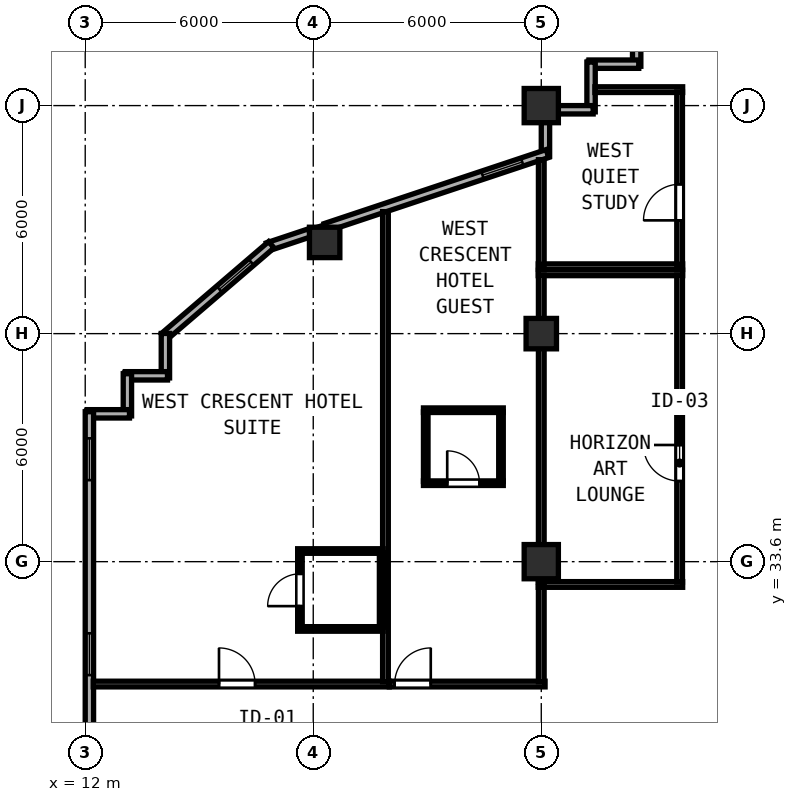
"""IFC4 building model, lengths in metres.
Left out: names, types, materials, properties, quantities, classifications, styles, units other than length and angle.
Written with IfcOpenShell. Run it as: python <this file> out.ifc"""

import sys

from ifc_helpers import new_model, si_unit, direction, frame, frame_2d, origin, origin_2d, place, context, subcontext, project, spatial, rectangle, hollow_rectangle, extrude, element, fill, save


model = new_model("IFC4")
c1 = context("Model", 3, precision=1e-05, world=origin(), true_north=direction((0.0, 1.0)))
c2 = subcontext(c1, "Body", "Model", "MODEL_VIEW")
j1 = project(units=[si_unit("LENGTHUNIT", "METRE"), si_unit("PLANEANGLEUNIT", "RADIAN")], contexts=[c1])
p1 = place(None, origin())
s1 = spatial("IfcSite", under=j1, at=p1, CompositionType="ELEMENT")
p2 = place(p1, origin())
s2 = spatial("IfcBuilding", under=s1, at=p2, CompositionType="ELEMENT")
p3 = place(p2, frame((0.0, 0.0, 184.2)))
s3 = spatial("IfcBuildingStorey", under=s2, at=p3, CompositionType="ELEMENT", Elevation=184.2)
for number, where, z_axis, x_axis in (
    (1, (24.0, 33.6, 0.0), (0.0, 0.0, 1.0), (1.0, 0.0, 0.0)),
    (2, (24.0, 45.6, 0.0), (0.0, 0.0, 1.0), (1.0, 0.0, 0.0)),
):
    element("IfcColumn", number, at=place(p3, frame(where, z_axis=z_axis, x_axis=x_axis)), inside=s3, PredefinedType="COLUMN", context=c2, shape_type="SweptSolid", body=[
        extrude(hollow_rectangle(XDim=0.9, YDim=0.9, WallThickness=0.034, at=origin_2d()), origin(), (0.0, 0.0, 1.0), 3.8),
    ])
for number, where, z_axis, x_axis in (
    (3, (24.0, 39.6, 0.0), (0.0, 0.0, 1.0), (1.0, 0.0, 0.0)),
    (4, (18.3, 42.0, 0.0), (0.0, 0.0, 1.0), (1.0, 0.0, 0.0)),
):
    element("IfcColumn", number, at=place(p3, frame(where, z_axis=z_axis, x_axis=x_axis)), inside=s3, PredefinedType="COLUMN", context=c2, shape_type="SweptSolid", body=[
        extrude(hollow_rectangle(XDim=0.8, YDim=0.8, WallThickness=0.03, at=origin_2d()), origin(), (0.0, 0.0, 1.0), 3.8),
    ])
p4 = place(p3, frame((26.51, 48.0, 0.0), z_axis=(0.0, 0.0, 1.0), x_axis=(0.0, -1.0, 0.0)))
e5 = element("IfcWall", 5, at=p4, inside=s3, PredefinedType="SOLIDWALL", context=c2, shape_type="SweptSolid", body=[
    extrude(rectangle(XDim=1.365, YDim=0.22, at=frame_2d((0.683, 0.0))), origin(), (0.0, 0.0, 1.0), 3.62),
])
for number, where, z_axis, x_axis in (
    (6, (26.565, 46.69, 0.0), (0.0, 0.0, 1.0), (-1.0, 0.0, 0.0)),
    (7, (25.31, 46.745, 0.0), (0.0, 0.0, 1.0), (0.0, -1.0, 0.0)),
):
    element("IfcWall", number, at=place(p3, frame(where, z_axis=z_axis, x_axis=x_axis)), inside=s3, PredefinedType="SOLIDWALL", context=c2, shape_type="SweptSolid", body=[
        extrude(rectangle(XDim=1.31, YDim=0.22, at=frame_2d((0.655, 0.0))), origin(), (0.0, 0.0, 1.0), 3.62),
    ])
p5 = place(p3, frame((25.365, 45.49, 0.0), z_axis=(0.0, 0.0, 1.0), x_axis=(-1.0, 0.0, 0.0)))
e8 = element("IfcWall", 8, at=p5, inside=s3, PredefinedType="SOLIDWALL", context=c2, shape_type="SweptSolid", body=[
    extrude(rectangle(XDim=0.923, YDim=0.22, at=frame_2d((0.461, 0.0))), origin(), (0.0, 0.0, 1.0), 3.62),
])
p6 = place(p3, frame((24.11, 45.158, 0.0), z_axis=(0.0, 0.0, 1.0), x_axis=(0.0, -1.0, 0.0)))
e9 = element("IfcWall", 9, at=p6, inside=s3, PredefinedType="SOLIDWALL", context=c2, shape_type="SweptSolid", body=[
    extrude(rectangle(XDim=0.892, YDim=0.22, at=frame_2d((0.446, 0.0))), origin(), (0.0, 0.0, 1.0), 3.215),
])
p7 = place(p3, frame((24.162, 44.338, 0.0), z_axis=(0.0, 0.0, 1.0), x_axis=(-0.948687265055, -0.316215864755, 0.0)))
e10 = element("IfcWall", 10, at=p7, inside=s3, PredefinedType="SOLIDWALL", context=c2, shape_type="SweptSolid", body=[
    extrude(rectangle(XDim=6.154, YDim=0.22, at=frame_2d((3.077, 0.0))), origin(), (0.0, 0.0, 1.0), 3.215),
])
p8 = place(p7, frame((0.7, 0.0, 0.85)))
e11 = element("IfcOpeningElement", 11, at=p8, cuts=e10, PredefinedType="OPENING", context=c2, shape_type="SweptSolid", body=[
    extrude(rectangle(XDim=1.1, YDim=1.75, at=frame_2d((0.55, 0.875))), frame((0.0, 0.12, 0.0), z_axis=(0.0, -1.0, 0.0), x_axis=(1.0, 0.0, 0.0)), (0.0, 0.0, 1.0), 0.24),
])
p9 = place(p3, frame((17.908, 42.253, 0.0), z_axis=(0.0, 0.0, 1.0), x_axis=(-0.948662335685, -0.316290646166, 0.0)))
e12 = element("IfcWall", 12, at=p9, inside=s3, PredefinedType="SOLIDWALL", context=c2, shape_type="SweptSolid", body=[
    extrude(rectangle(XDim=1.165, YDim=0.22, at=frame_2d((0.583, 0.0))), origin(), (0.0, 0.0, 1.0), 3.62),
])
p10 = place(p3, frame((16.897, 41.938, 0.0), z_axis=(0.0, 0.0, 1.0), x_axis=(-0.759279729622, -0.650764390686, 0.0)))
e13 = element("IfcWall", 13, at=p10, inside=s3, PredefinedType="SOLIDWALL", context=c2, shape_type="SweptSolid", body=[
    extrude(rectangle(XDim=3.726, YDim=0.22, at=frame_2d((1.863, 0.0))), origin(), (0.0, 0.0, 1.0), 3.62),
])
p11 = place(p10, frame((0.7, 0.0, 0.85)))
e14 = element("IfcOpeningElement", 14, at=p11, cuts=e13, PredefinedType="OPENING", context=c2, shape_type="SweptSolid", body=[
    extrude(rectangle(XDim=1.1, YDim=1.75, at=frame_2d((0.55, 0.875))), frame((0.0, 0.12, 0.0), z_axis=(0.0, -1.0, 0.0), x_axis=(1.0, 0.0, 0.0)), (0.0, 0.0, 1.0), 0.24),
])
p12 = place(p3, frame((14.11, 39.604, 0.0), z_axis=(0.0, 0.0, 1.0), x_axis=(0.0, -1.0, 0.0)))
e15 = element("IfcWall", 15, at=p12, inside=s3, PredefinedType="SOLIDWALL", context=c2, shape_type="SweptSolid", body=[
    extrude(rectangle(XDim=1.169, YDim=0.22, at=frame_2d((0.585, 0.0))), origin(), (0.0, 0.0, 1.0), 3.62),
])
p13 = place(p3, frame((14.165, 38.49, 0.0), z_axis=(0.0, 0.0, 1.0), x_axis=(-1.0, 0.0, 0.0)))
e16 = element("IfcWall", 16, at=p13, inside=s3, PredefinedType="SOLIDWALL", context=c2, shape_type="SweptSolid", body=[
    extrude(rectangle(XDim=1.11, YDim=0.22, at=frame_2d((0.555, 0.0))), origin(), (0.0, 0.0, 1.0), 3.62),
])
p14 = place(p3, frame((13.11, 38.545, 0.0), z_axis=(0.0, 0.0, 1.0), x_axis=(0.0, -1.0, 0.0)))
e17 = element("IfcWall", 17, at=p14, inside=s3, PredefinedType="SOLIDWALL", context=c2, shape_type="SweptSolid", body=[
    extrude(rectangle(XDim=1.11, YDim=0.22, at=frame_2d((0.555, 0.0))), origin(), (0.0, 0.0, 1.0), 3.62),
])
p15 = place(p3, frame((13.165, 37.49, 0.0), z_axis=(0.0, 0.0, 1.0), x_axis=(-1.0, 0.0, 0.0)))
e18 = element("IfcWall", 18, at=p15, inside=s3, PredefinedType="SOLIDWALL", context=c2, shape_type="SweptSolid", body=[
    extrude(rectangle(XDim=1.11, YDim=0.22, at=frame_2d((0.555, 0.0))), origin(), (0.0, 0.0, 1.0), 3.62),
])
p16 = place(p3, frame((12.11, 37.545, 0.0), z_axis=(0.0, 0.0, 1.0), x_axis=(0.0, -1.0, 0.0)))
e19 = element("IfcWall", 19, at=p16, inside=s3, PredefinedType="SOLIDWALL", context=c2, shape_type="SweptSolid", body=[
    extrude(rectangle(XDim=21.145, YDim=0.22, at=frame_2d((10.573, 0.0))), origin(), (0.0, 0.0, 1.0), 3.62),
])
p17 = place(p16, frame((0.7, 0.0, 0.85)))
e20 = element("IfcOpeningElement", 20, at=p17, cuts=e19, PredefinedType="OPENING", context=c2, shape_type="SweptSolid", body=[
    extrude(rectangle(XDim=1.1, YDim=1.75, at=frame_2d((0.55, 0.875))), frame((0.0, 0.12, 0.0), z_axis=(0.0, -1.0, 0.0), x_axis=(1.0, 0.0, 0.0)), (0.0, 0.0, 1.0), 0.24),
])
p18 = place(p16, frame((5.83, 0.0, 0.85)))
e21 = element("IfcOpeningElement", 21, at=p18, cuts=e19, PredefinedType="OPENING", context=c2, shape_type="SweptSolid", body=[
    extrude(rectangle(XDim=1.1, YDim=1.75, at=frame_2d((0.55, 0.875))), frame((0.0, 0.12, 0.0), z_axis=(0.0, -1.0, 0.0), x_axis=(1.0, 0.0, 0.0)), (0.0, 0.0, 1.0), 0.24),
])
p19 = place(p16, frame((11.5, 0.0, 0.85)))
e22 = element("IfcOpeningElement", 22, at=p19, cuts=e19, PredefinedType="OPENING", context=c2, shape_type="SweptSolid", body=[
    extrude(rectangle(XDim=1.1, YDim=1.75, at=frame_2d((0.55, 0.875))), frame((0.0, 0.12, 0.0), z_axis=(0.0, -1.0, 0.0), x_axis=(1.0, 0.0, 0.0)), (0.0, 0.0, 1.0), 0.24),
])
p20 = place(p16, frame((16.9, 0.0, 0.85)))
e23 = element("IfcOpeningElement", 23, at=p20, cuts=e19, PredefinedType="OPENING", context=c2, shape_type="SweptSolid", body=[
    extrude(rectangle(XDim=1.1, YDim=1.75, at=frame_2d((0.55, 0.875))), frame((0.0, 0.12, 0.0), z_axis=(0.0, -1.0, 0.0), x_axis=(1.0, 0.0, 0.0)), (0.0, 0.0, 1.0), 0.24),
])
for number, where, z_axis, x_axis in (
    (24, (23.92, 41.2, 0.0), (0.0, 0.0, 1.0), (1.0, 0.0, 0.0)),
    (25, (23.92, 33.0, 0.0), (0.0, 0.0, 1.0), (1.0, 0.0, 0.0)),
):
    element("IfcWall", number, at=place(p3, frame(where, z_axis=z_axis, x_axis=x_axis)), inside=s3, PredefinedType="PARTITIONING", context=c2, shape_type="SweptSolid", body=[
        extrude(rectangle(XDim=3.8, YDim=0.15, at=frame_2d((1.9, 0.0))), origin(), (0.0, 0.0, 1.0), 3.62),
    ])
p21 = place(p3, frame((24.0, 33.06, 0.0), z_axis=(0.0, 0.0, 1.0), x_axis=(0.0, 1.0, 0.0)))
e26 = element("IfcWall", 26, at=p21, inside=s3, PredefinedType="PARTITIONING", context=c2, shape_type="SweptSolid", body=[
    extrude(rectangle(XDim=8.08, YDim=0.15, at=frame_2d((4.04, 0.0))), origin(), (0.0, 0.0, 1.0), 3.215),
])
p22 = place(p3, frame((27.64, 33.06, 0.0), z_axis=(0.0, 0.0, 1.0), x_axis=(0.0, 1.0, 0.0)))
e27 = element("IfcWall", 27, at=p22, inside=s3, PredefinedType="PARTITIONING", context=c2, shape_type="SweptSolid", body=[
    extrude(rectangle(XDim=8.08, YDim=0.15, at=frame_2d((4.04, 0.0))), origin(), (0.0, 0.0, 1.0), 3.62),
])
p23 = place(p22, frame((3.61, 0.0, 0.0), z_axis=(0.0, 0.0, 1.0), x_axis=(-1.0, 0.0, 0.0)))
e28 = element("IfcOpeningElement", 28, at=p23, cuts=e27, PredefinedType="OPENING", context=c2, shape_type="SweptSolid", body=[
    extrude(rectangle(XDim=0.95, YDim=2.12, at=frame_2d((0.475, 1.06))), frame((0.0, 0.085, 0.0), z_axis=(0.0, -1.0, 0.0), x_axis=(1.0, 0.0, 0.0)), (0.0, 0.0, 1.0), 0.17),
])
p24 = place(p3, frame((25.412, 46.02, 0.0), z_axis=(0.0, 0.0, 1.0), x_axis=(1.0, 0.0, 0.0)))
e29 = element("IfcWall", 29, at=p24, inside=s3, PredefinedType="PARTITIONING", context=c2, shape_type="SweptSolid", body=[
    extrude(rectangle(XDim=2.308, YDim=0.15, at=frame_2d((1.154, 0.0))), origin(), (0.0, 0.0, 1.0), 3.62),
])
p25 = place(p3, frame((23.92, 41.36, 0.0), z_axis=(0.0, 0.0, 1.0), x_axis=(1.0, 0.0, 0.0)))
e30 = element("IfcWall", 30, at=p25, inside=s3, PredefinedType="PARTITIONING", context=c2, shape_type="SweptSolid", body=[
    extrude(rectangle(XDim=3.8, YDim=0.15, at=frame_2d((1.9, 0.0))), origin(), (0.0, 0.0, 1.0), 3.62),
])
p26 = place(p3, frame((24.0, 41.42, 0.0), z_axis=(0.0, 0.0, 1.0), x_axis=(0.0, 1.0, 0.0)))
e31 = element("IfcWall", 31, at=p26, inside=s3, PredefinedType="PARTITIONING", context=c2, shape_type="SweptSolid", body=[
    extrude(rectangle(XDim=2.757, YDim=0.15, at=frame_2d((1.378, 0.0))), origin(), (0.0, 0.0, 1.0), 3.215),
])
p27 = place(p3, frame((27.64, 41.42, 0.0), z_axis=(0.0, 0.0, 1.0), x_axis=(0.0, 1.0, 0.0)))
e32 = element("IfcWall", 32, at=p27, inside=s3, PredefinedType="PARTITIONING", context=c2, shape_type="SweptSolid", body=[
    extrude(rectangle(XDim=4.54, YDim=0.15, at=frame_2d((2.27, 0.0))), origin(), (0.0, 0.0, 1.0), 3.62),
])
p28 = place(p27, frame((2.11, 0.0, 0.0), z_axis=(0.0, 0.0, 1.0), x_axis=(-1.0, 0.0, 0.0)))
e33 = element("IfcOpeningElement", 33, at=p28, cuts=e32, PredefinedType="OPENING", context=c2, shape_type="SweptSolid", body=[
    extrude(rectangle(XDim=0.95, YDim=2.12, at=frame_2d((0.475, 1.06))), frame((0.0, 0.085, 0.0), z_axis=(0.0, -1.0, 0.0), x_axis=(1.0, 0.0, 0.0)), (0.0, 0.0, 1.0), 0.17),
])
p29 = place(p3, frame((12.212, 30.38, 0.0), z_axis=(0.0, 0.0, 1.0), x_axis=(1.0, 0.0, 0.0)))
e34 = element("IfcWall", 34, at=p29, inside=s3, PredefinedType="PARTITIONING", context=c2, shape_type="SweptSolid", body=[
    extrude(rectangle(XDim=7.788, YDim=0.15, at=frame_2d((3.894, 0.0))), origin(), (0.0, 0.0, 1.0), 3.62),
])
p30 = place(p29, frame((3.308, 0.0, 0.0)))
e35 = element("IfcOpeningElement", 35, at=p30, cuts=e34, PredefinedType="OPENING", context=c2, shape_type="SweptSolid", body=[
    extrude(rectangle(XDim=0.95, YDim=2.18, at=frame_2d((0.475, 1.09))), frame((0.0, 0.085, 0.0), z_axis=(0.0, -1.0, 0.0), x_axis=(1.0, 0.0, 0.0)), (0.0, 0.0, 1.0), 0.17),
])
p31 = place(p3, frame((19.9, 30.44, 0.0), z_axis=(0.0, 0.0, 1.0), x_axis=(0.0, 1.0, 0.0)))
e36 = element("IfcWall", 36, at=p31, inside=s3, PredefinedType="PARTITIONING", context=c2, shape_type="SweptSolid", body=[
    extrude(rectangle(XDim=12.37, YDim=0.15, at=frame_2d((6.185, 0.0))), origin(), (0.0, 0.0, 1.0), 3.62),
])
for number, where, z_axis, x_axis in (
    (37, (17.59, 33.88, 0.0), (0.0, 0.0, 1.0), (1.0, 0.0, 0.0)),
    (38, (17.59, 31.83, 0.0), (0.0, 0.0, 1.0), (1.0, 0.0, 0.0)),
):
    element("IfcWall", number, at=place(p3, frame(where, z_axis=z_axis, x_axis=x_axis)), inside=s3, PredefinedType="PARTITIONING", context=c2, shape_type="SweptSolid", body=[
        extrude(rectangle(XDim=2.25, YDim=0.12, at=frame_2d((1.125, 0.0))), origin(), (0.0, 0.0, 1.0), 3.62),
    ])
p32 = place(p3, frame((17.65, 31.875, 0.0), z_axis=(0.0, 0.0, 1.0), x_axis=(0.0, 1.0, 0.0)))
e39 = element("IfcWall", 39, at=p32, inside=s3, PredefinedType="PARTITIONING", context=c2, shape_type="SweptSolid", body=[
    extrude(rectangle(XDim=1.96, YDim=0.12, at=frame_2d((0.98, 0.0))), origin(), (0.0, 0.0, 1.0), 3.62),
])
p33 = place(p32, frame((1.405, 0.0, 0.0), z_axis=(0.0, 0.0, 1.0), x_axis=(-1.0, 0.0, 0.0)))
e40 = element("IfcOpeningElement", 40, at=p33, cuts=e39, PredefinedType="OPENING", context=c2, shape_type="SweptSolid", body=[
    extrude(rectangle(XDim=0.85, YDim=2.1, at=frame_2d((0.425, 1.05))), frame((0.0, 0.07, 0.0), z_axis=(0.0, -1.0, 0.0), x_axis=(1.0, 0.0, 0.0)), (0.0, 0.0, 1.0), 0.14),
])
p34 = place(p3, frame((19.8, 31.875, 0.0), z_axis=(0.0, 0.0, 1.0), x_axis=(0.0, 1.0, 0.0)))
e41 = element("IfcWall", 41, at=p34, inside=s3, PredefinedType="PARTITIONING", context=c2, shape_type="SweptSolid", body=[
    extrude(rectangle(XDim=1.96, YDim=0.12, at=frame_2d((0.98, 0.0))), origin(), (0.0, 0.0, 1.0), 3.62),
])
p35 = place(p3, frame((20.002, 30.38, 0.0), z_axis=(0.0, 0.0, 1.0), x_axis=(1.0, 0.0, 0.0)))
e42 = element("IfcWall", 42, at=p35, inside=s3, PredefinedType="PARTITIONING", context=c2, shape_type="SweptSolid", body=[
    extrude(rectangle(XDim=4.098, YDim=0.15, at=frame_2d((2.049, 0.0))), origin(), (0.0, 0.0, 1.0), 3.62),
])
p36 = place(p35, frame((0.14, 0.0, 0.0)))
e43 = element("IfcOpeningElement", 43, at=p36, cuts=e42, PredefinedType="OPENING", context=c2, shape_type="SweptSolid", body=[
    extrude(rectangle(XDim=0.95, YDim=2.15, at=frame_2d((0.475, 1.075))), frame((0.0, 0.085, 0.0), z_axis=(0.0, -1.0, 0.0), x_axis=(1.0, 0.0, 0.0)), (0.0, 0.0, 1.0), 0.17),
])
p37 = place(p3, frame((24.0, 30.44, 0.0), z_axis=(0.0, 0.0, 1.0), x_axis=(0.0, 1.0, 0.0)))
e44 = element("IfcWall", 44, at=p37, inside=s3, PredefinedType="PARTITIONING", context=c2, shape_type="SweptSolid", body=[
    extrude(rectangle(XDim=2.5, YDim=0.15, at=frame_2d((1.25, 0.0))), origin(), (0.0, 0.0, 1.0), 3.215),
])
p38 = place(p3, frame((20.9, 37.585, 0.0), z_axis=(0.0, 0.0, 1.0), x_axis=(1.0, 0.0, 0.0)))
e45 = element("IfcWall", 45, at=p38, inside=s3, PredefinedType="PARTITIONING", context=c2, shape_type="SweptSolid", body=[
    extrude(rectangle(XDim=2.1, YDim=0.12, at=frame_2d((1.05, 0.0))), origin(), (0.0, 0.0, 1.0), 3.62),
])
p39 = place(p3, frame((20.9, 35.665, 0.0), z_axis=(0.0, 0.0, 1.0), x_axis=(1.0, 0.0, 0.0)))
e46 = element("IfcWall", 46, at=p39, inside=s3, PredefinedType="PARTITIONING", context=c2, shape_type="SweptSolid", body=[
    extrude(rectangle(XDim=2.1, YDim=0.12, at=frame_2d((1.05, 0.0))), origin(), (0.0, 0.0, 1.0), 3.62),
])
p40 = place(p39, frame((0.625, 0.0, 0.0)))
e47 = element("IfcOpeningElement", 47, at=p40, cuts=e46, PredefinedType="OPENING", context=c2, shape_type="SweptSolid", body=[
    extrude(rectangle(XDim=0.85, YDim=2.1, at=frame_2d((0.425, 1.05))), frame((0.0, 0.07, 0.0), z_axis=(0.0, -1.0, 0.0), x_axis=(1.0, 0.0, 0.0)), (0.0, 0.0, 1.0), 0.14),
])
for number, where, z_axis, x_axis in (
    (48, (20.96, 35.71, 0.0), (0.0, 0.0, 1.0), (0.0, 1.0, 0.0)),
    (49, (22.94, 35.71, 0.0), (0.0, 0.0, 1.0), (0.0, 1.0, 0.0)),
):
    element("IfcWall", number, at=place(p3, frame(where, z_axis=z_axis, x_axis=x_axis)), inside=s3, PredefinedType="PARTITIONING", context=c2, shape_type="SweptSolid", body=[
        extrude(rectangle(XDim=1.83, YDim=0.12, at=frame_2d((0.915, 0.0))), origin(), (0.0, 0.0, 1.0), 3.62),
    ])
p41 = place(p8, origin())
e50 = element("IfcWindow", 50, at=p41, inside=s3, PartitioningType="SINGLE_PANEL", PredefinedType="WINDOW", context=c2, shape_type="SweptSolid", body=[
    extrude(rectangle(XDim=1.1, YDim=1.75, at=frame_2d((0.55, 0.875))), frame((0.0, 0.03, 0.0), z_axis=(0.0, -1.0, 0.0), x_axis=(1.0, 0.0, 0.0)), (0.0, 0.0, 1.0), 0.06),
])
fill(e11, e50)
p42 = place(p11, origin())
e51 = element("IfcWindow", 51, at=p42, inside=s3, PartitioningType="SINGLE_PANEL", PredefinedType="WINDOW", context=c2, shape_type="SweptSolid", body=[
    extrude(rectangle(XDim=1.1, YDim=1.75, at=frame_2d((0.55, 0.875))), frame((0.0, 0.03, 0.0), z_axis=(0.0, -1.0, 0.0), x_axis=(1.0, 0.0, 0.0)), (0.0, 0.0, 1.0), 0.06),
])
fill(e14, e51)
p43 = place(p17, origin())
e52 = element("IfcWindow", 52, at=p43, inside=s3, PartitioningType="SINGLE_PANEL", PredefinedType="WINDOW", context=c2, shape_type="SweptSolid", body=[
    extrude(rectangle(XDim=1.1, YDim=1.75, at=frame_2d((0.55, 0.875))), frame((0.0, 0.03, 0.0), z_axis=(0.0, -1.0, 0.0), x_axis=(1.0, 0.0, 0.0)), (0.0, 0.0, 1.0), 0.06),
])
fill(e20, e52)
p44 = place(p18, origin())
e53 = element("IfcWindow", 53, at=p44, inside=s3, PartitioningType="SINGLE_PANEL", PredefinedType="WINDOW", context=c2, shape_type="SweptSolid", body=[
    extrude(rectangle(XDim=1.1, YDim=1.75, at=frame_2d((0.55, 0.875))), frame((0.0, 0.03, 0.0), z_axis=(0.0, -1.0, 0.0), x_axis=(1.0, 0.0, 0.0)), (0.0, 0.0, 1.0), 0.06),
])
fill(e21, e53)
p45 = place(p23, origin())
e54 = element("IfcDoor", 54, at=p45, inside=s3, OperationType="SINGLE_SWING_LEFT", PredefinedType="DOOR", context=c2, shape_type="SweptSolid", body=[
    extrude(rectangle(XDim=0.95, YDim=2.12, at=frame_2d((0.475, 1.06))), frame((0.0, 0.025, 0.0), z_axis=(0.0, -1.0, 0.0), x_axis=(1.0, 0.0, 0.0)), (0.0, 0.0, 1.0), 0.05),
])
fill(e28, e54)
p46 = place(p28, origin())
e55 = element("IfcDoor", 55, at=p46, inside=s3, OperationType="SINGLE_SWING_RIGHT", PredefinedType="DOOR", context=c2, shape_type="SweptSolid", body=[
    extrude(rectangle(XDim=0.95, YDim=2.12, at=frame_2d((0.475, 1.06))), frame((0.0, 0.025, 0.0), z_axis=(0.0, -1.0, 0.0), x_axis=(1.0, 0.0, 0.0)), (0.0, 0.0, 1.0), 0.05),
])
fill(e33, e55)
p47 = place(p30, origin())
e56 = element("IfcDoor", 56, at=p47, inside=s3, OperationType="SINGLE_SWING_LEFT", PredefinedType="DOOR", context=c2, shape_type="SweptSolid", body=[
    extrude(rectangle(XDim=0.95, YDim=2.18, at=frame_2d((0.475, 1.09))), frame((0.0, 0.025, 0.0), z_axis=(0.0, -1.0, 0.0), x_axis=(1.0, 0.0, 0.0)), (0.0, 0.0, 1.0), 0.05),
])
fill(e35, e56)
p48 = place(p33, origin())
e57 = element("IfcDoor", 57, at=p48, inside=s3, OperationType="SINGLE_SWING_RIGHT", PredefinedType="DOOR", context=c2, shape_type="SweptSolid", body=[
    extrude(rectangle(XDim=0.85, YDim=2.1, at=frame_2d((0.425, 1.05))), frame((0.0, 0.025, 0.0), z_axis=(0.0, -1.0, 0.0), x_axis=(1.0, 0.0, 0.0)), (0.0, 0.0, 1.0), 0.05),
])
fill(e40, e57)
p49 = place(p36, origin())
e58 = element("IfcDoor", 58, at=p49, inside=s3, OperationType="SINGLE_SWING_RIGHT", PredefinedType="DOOR", context=c2, shape_type="SweptSolid", body=[
    extrude(rectangle(XDim=0.95, YDim=2.15, at=frame_2d((0.475, 1.075))), frame((0.0, 0.025, 0.0), z_axis=(0.0, -1.0, 0.0), x_axis=(1.0, 0.0, 0.0)), (0.0, 0.0, 1.0), 0.05),
])
fill(e43, e58)
p50 = place(p40, origin())
e59 = element("IfcDoor", 59, at=p50, inside=s3, OperationType="SINGLE_SWING_LEFT", PredefinedType="DOOR", context=c2, shape_type="SweptSolid", body=[
    extrude(rectangle(XDim=0.85, YDim=2.1, at=frame_2d((0.425, 1.05))), frame((0.0, 0.025, 0.0), z_axis=(0.0, -1.0, 0.0), x_axis=(1.0, 0.0, 0.0)), (0.0, 0.0, 1.0), 0.05),
])
fill(e47, e59)
save(model, sys.argv[1])
